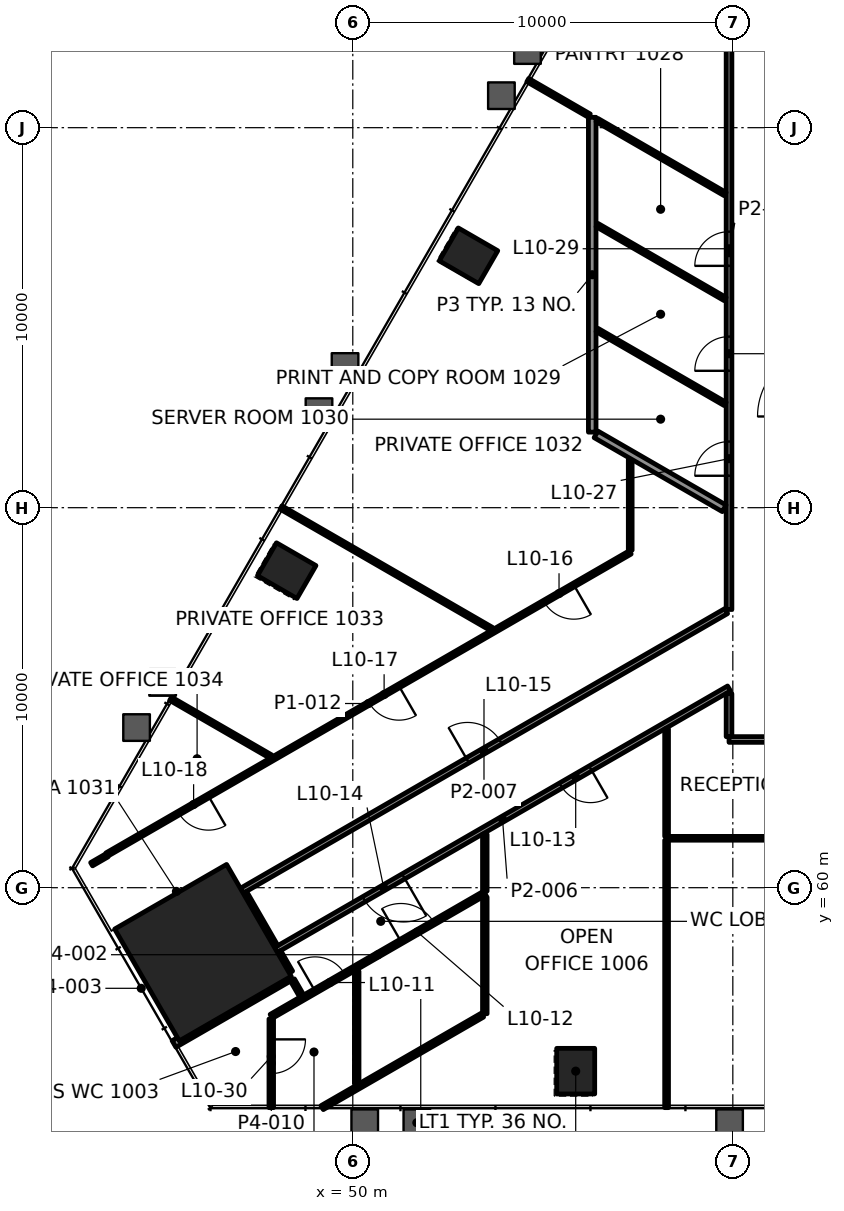
"""IFC4 building model, lengths in metres.
Left out: names, types, materials, properties, quantities, classifications, styles, units other than length and angle.
Written with IfcOpenShell. Run it as: python <this file> out.ifc"""

import sys

from ifc_helpers import new_model, si_unit, direction, frame, frame_2d, origin, origin_2d, place, context, subcontext, project, spatial, rectangle, extrude, element, fill, save


model = new_model("IFC4")
c1 = context("Model", 3, precision=1e-05, world=origin(), true_north=direction((0.0, 1.0)))
c2 = subcontext(c1, "Body", "Model", "MODEL_VIEW")
j1 = project(units=[si_unit("LENGTHUNIT", "METRE"), si_unit("PLANEANGLEUNIT", "RADIAN")], contexts=[c1])
p1 = place(None, origin())
s1 = spatial("IfcSite", under=j1, at=p1, CompositionType="ELEMENT")
p2 = place(p1, origin())
s2 = spatial("IfcBuilding", under=s1, at=p2, CompositionType="ELEMENT")
p3 = place(p2, frame((0.0, 0.0, 48.4)))
s3 = spatial("IfcBuildingStorey", under=s2, at=p3, CompositionType="ELEMENT", Elevation=48.4)
p4 = place(p3, frame((46.057, 58.29, 0.0), z_axis=(0.0, 0.0, 1.0), x_axis=(0.5, -0.866025403784, 0.0)))
e1 = element("IfcColumn", 1, at=p4, inside=s3, PredefinedType="COLUMN", context=c2, shape_type="SweptSolid", body=[
    extrude(rectangle(XDim=3.4, YDim=3.4, at=origin_2d()), origin(), (0.0, 0.0, 1.0), 4.2),
])
for number, where, z_axis, x_axis in (
    (2, (55.865, 55.172, -0.0), (0.0, 0.0, 1.0), (1.0, 0.0, 0.0)),
    (3, (53.045, 76.628, -0.0), (0.0, 0.0, 1.0), (-0.5, -0.866, 0.0)),
    (4, (48.261, 68.343, -0.0), (0.0, 0.0, 1.0), (-0.5, -0.866, 0.0)),
):
    element("IfcColumn", number, at=place(p3, frame(where, z_axis=z_axis, x_axis=x_axis)), inside=s3, PredefinedType="COLUMN", context=c2, shape_type="SweptSolid", body=[
        extrude(rectangle(XDim=1.0, YDim=1.2, at=origin_2d()), origin(), (0.0, 0.0, 1.0), 4.2),
    ])
p5 = place(p3, frame((58.271, 61.3, 0.0), z_axis=(0.0, 0.0, 1.0), x_axis=(1.0, 0.0, 0.0)))
e5 = element("IfcWall", 5, at=p5, inside=s3, PredefinedType="PARTITIONING", context=c2, shape_type="SweptSolid", body=[
    extrude(rectangle(XDim=16.729, YDim=0.1, at=frame_2d((8.365, 0.0))), origin(), (0.0, 0.0, 1.0), 3.4),
])
p6 = place(p5, frame((7.865, 0.0, 0.0)))
e6 = element("IfcOpeningElement", 6, at=p6, cuts=e5, PredefinedType="OPENING", context=c2, shape_type="SweptSolid", body=[
    extrude(rectangle(XDim=1.0, YDim=2.1, at=frame_2d((0.5, 1.05))), frame((0.0, 0.06, 0.0), z_axis=(0.0, -1.0, 0.0), x_axis=(1.0, 0.0, 0.0)), (0.0, 0.0, 1.0), 0.12),
])
p7 = place(p3, frame((90.1, 63.9, 0.0), z_axis=(0.0, 0.0, 1.0), x_axis=(-1.0, 0.0, 0.0)))
e7 = element("IfcWall", 7, at=p7, inside=s3, PredefinedType="PARTITIONING", context=c2, shape_type="SweptSolid", body=[
    extrude(rectangle(XDim=30.2, YDim=0.15, at=frame_2d((15.1, 0.0))), origin(), (0.0, 0.0, 1.0), 3.4),
])
p8 = place(p7, frame((3.578, 0.0, 0.0)))
e8 = element("IfcOpeningElement", 8, at=p8, cuts=e7, PredefinedType="OPENING", context=c2, shape_type="SweptSolid", body=[
    extrude(rectangle(XDim=1.0, YDim=2.1, at=frame_2d((0.5, 1.05))), frame((0.0, 0.085, 0.0), z_axis=(0.0, -1.0, 0.0), x_axis=(1.0, 0.0, 0.0)), (0.0, 0.0, 1.0), 0.17),
])
p9 = place(p7, frame((10.926, 0.0, 0.0)))
e9 = element("IfcOpeningElement", 9, at=p9, cuts=e7, PredefinedType="OPENING", context=c2, shape_type="SweptSolid", body=[
    extrude(rectangle(XDim=1.0, YDim=2.1, at=frame_2d((0.5, 1.05))), frame((0.0, 0.085, 0.0), z_axis=(0.0, -1.0, 0.0), x_axis=(1.0, 0.0, 0.0)), (0.0, 0.0, 1.0), 0.17),
])
p10 = place(p7, frame((22.048, 0.0, 0.0)))
e10 = element("IfcOpeningElement", 10, at=p10, cuts=e7, PredefinedType="OPENING", context=c2, shape_type="SweptSolid", body=[
    extrude(rectangle(XDim=1.0, YDim=2.1, at=frame_2d((0.5, 1.05))), frame((0.0, 0.085, 0.0), z_axis=(0.0, -1.0, 0.0), x_axis=(1.0, 0.0, 0.0)), (0.0, 0.0, 1.0), 0.17),
])
p11 = place(p3, frame((49.194, 54.212, 0.0), z_axis=(0.0, 0.0, 1.0), x_axis=(0.866016997745, 0.500014559404, 0.0)))
e11 = element("IfcWall", 11, at=p11, inside=s3, PredefinedType="PARTITIONING", context=c2, shape_type="SweptSolid", body=[
    extrude(rectangle(XDim=4.871, YDim=0.12, at=frame_2d((2.436, 0.0))), origin(), (0.0, 0.0, 1.0), 3.4),
])
p12 = place(p3, frame((47.855, 56.615, 0.0), z_axis=(0.0, 0.0, 1.0), x_axis=(0.866008853477, 0.500028664877, 0.0)))
e12 = element("IfcWall", 12, at=p12, inside=s3, PredefinedType="PARTITIONING", context=c2, shape_type="SweptSolid", body=[
    extrude(rectangle(XDim=6.487, YDim=0.12, at=frame_2d((3.244, 0.0))), origin(), (0.0, 0.0, 1.0), 3.4),
])
p13 = place(p12, frame((1.329, 0.0, 0.0)))
e13 = element("IfcOpeningElement", 13, at=p13, cuts=e12, PredefinedType="OPENING", context=c2, shape_type="SweptSolid", body=[
    extrude(rectangle(XDim=0.9, YDim=2.1, at=frame_2d((0.45, 1.05))), frame((0.0, 0.07, 0.0), z_axis=(0.0, -1.0, 0.0), x_axis=(1.0, 0.0, 0.0)), (0.0, 0.0, 1.0), 0.14),
])
p14 = place(p12, frame((3.939, 0.0, 0.0)))
e14 = element("IfcOpeningElement", 14, at=p14, cuts=e12, PredefinedType="OPENING", context=c2, shape_type="SweptSolid", body=[
    extrude(rectangle(XDim=1.0, YDim=2.1, at=frame_2d((0.5, 1.05))), frame((0.0, 0.07, 0.0), z_axis=(0.0, -1.0, 0.0), x_axis=(1.0, 0.0, 0.0)), (0.0, 0.0, 1.0), 0.14),
])
p15 = place(p3, frame((45.296, 55.888, 0.0), z_axis=(0.0, 0.0, 1.0), x_axis=(0.866016916595, 0.500014699955, 0.0)))
e15 = element("IfcWall", 15, at=p15, inside=s3, PredefinedType="PARTITIONING", context=c2, shape_type="SweptSolid", body=[
    extrude(rectangle(XDim=3.543, YDim=0.2, at=frame_2d((1.772, 0.0))), origin(), (0.0, 0.0, 1.0), 3.4),
])
p16 = place(p3, frame((59.9, 65.243, 0.0), z_axis=(0.0, 0.0, 1.0), x_axis=(-0.866026378386, -0.499998311937, 0.0)))
e16 = element("IfcWall", 16, at=p16, inside=s3, PredefinedType="PARTITIONING", context=c2, shape_type="SweptSolid", body=[
    extrude(rectangle(XDim=13.764, YDim=0.15, at=frame_2d((6.882, 0.0))), origin(), (0.0, 0.0, 1.0), 3.247),
])
p17 = place(p16, frame((4.209, 0.0, 0.0)))
e17 = element("IfcOpeningElement", 17, at=p17, cuts=e16, PredefinedType="OPENING", context=c2, shape_type="SweptSolid", body=[
    extrude(rectangle(XDim=0.9, YDim=2.1, at=frame_2d((0.45, 1.05))), frame((0.0, 0.085, 0.0), z_axis=(0.0, -1.0, 0.0), x_axis=(1.0, 0.0, 0.0)), (0.0, 0.0, 1.0), 0.17),
])
p18 = place(p16, frame((9.891, 0.0, 0.0)))
e18 = element("IfcOpeningElement", 18, at=p18, cuts=e16, PredefinedType="OPENING", context=c2, shape_type="SweptSolid", body=[
    extrude(rectangle(XDim=1.2, YDim=2.1, at=frame_2d((0.6, 1.05))), frame((0.0, 0.085, 0.0), z_axis=(0.0, -1.0, 0.0), x_axis=(1.0, 0.0, 0.0)), (0.0, 0.0, 1.0), 0.17),
])
p19 = place(p3, frame((47.08, 59.92, 0.0), z_axis=(0.0, 0.0, 1.0), x_axis=(0.866025356753, 0.50000008146, 0.0)))
e19 = element("IfcWall", 19, at=p19, inside=s3, PredefinedType="PARTITIONING", context=c2, shape_type="SweptSolid", body=[
    extrude(rectangle(XDim=14.717, YDim=0.15, at=frame_2d((7.358, 0.0))), origin(), (0.0, 0.0, 1.0), 3.4),
])
p20 = place(p19, frame((6.858, 0.0, 0.0)))
e20 = element("IfcOpeningElement", 20, at=p20, cuts=e19, PredefinedType="OPENING", context=c2, shape_type="SweptSolid", body=[
    extrude(rectangle(XDim=1.0, YDim=2.1, at=frame_2d((0.5, 1.05))), frame((0.0, 0.085, 0.0), z_axis=(0.0, -1.0, 0.0), x_axis=(1.0, 0.0, 0.0)), (0.0, 0.0, 1.0), 0.17),
])
p21 = place(p3, frame((43.127, 60.618, 0.0), z_axis=(0.0, 0.0, 1.0), x_axis=(0.865979310119, 0.500079828073, 0.0)))
e21 = element("IfcWall", 21, at=p21, inside=s3, PredefinedType="PARTITIONING", context=c2, shape_type="SweptSolid", body=[
    extrude(rectangle(XDim=0.473, YDim=0.1, at=frame_2d((0.237, 0.0))), origin(), (0.0, 0.0, 1.0), 3.4),
])
p22 = place(p3, frame((57.3, 68.823, 0.0), z_axis=(0.0, 0.0, 1.0), x_axis=(-0.8660275888, -0.499996215423, 0.0)))
e22 = element("IfcWall", 22, at=p22, inside=s3, PredefinedType="PARTITIONING", context=c2, shape_type="SweptSolid", body=[
    extrude(rectangle(XDim=15.902, YDim=0.1, at=frame_2d((7.951, 0.0))), origin(), (0.0, 0.0, 1.0), 3.4),
])
p23 = place(p22, frame((1.713, 0.0, 0.0)))
e23 = element("IfcOpeningElement", 23, at=p23, cuts=e22, PredefinedType="OPENING", context=c2, shape_type="SweptSolid", body=[
    extrude(rectangle(XDim=0.9, YDim=2.1, at=frame_2d((0.45, 1.05))), frame((0.0, 0.06, 0.0), z_axis=(0.0, -1.0, 0.0), x_axis=(1.0, 0.0, 0.0)), (0.0, 0.0, 1.0), 0.12),
])
p24 = place(p22, frame((7.027, 0.0, 0.0)))
e24 = element("IfcOpeningElement", 24, at=p24, cuts=e22, PredefinedType="OPENING", context=c2, shape_type="SweptSolid", body=[
    extrude(rectangle(XDim=0.9, YDim=2.1, at=frame_2d((0.45, 1.05))), frame((0.0, 0.06, 0.0), z_axis=(0.0, -1.0, 0.0), x_axis=(1.0, 0.0, 0.0)), (0.0, 0.0, 1.0), 0.12),
])
p25 = place(p22, frame((12.816, 0.0, 0.0)))
e25 = element("IfcOpeningElement", 25, at=p25, cuts=e22, PredefinedType="OPENING", context=c2, shape_type="SweptSolid", body=[
    extrude(rectangle(XDim=0.9, YDim=2.1, at=frame_2d((0.45, 1.05))), frame((0.0, 0.06, 0.0), z_axis=(0.0, -1.0, 0.0), x_axis=(1.0, 0.0, 0.0)), (0.0, 0.0, 1.0), 0.12),
])
p26 = place(p3, frame((59.9, 63.975, 0.0), z_axis=(0.0, 0.0, 1.0), x_axis=(0.0, 1.0, 0.0)))
e26 = element("IfcWall", 26, at=p26, inside=s3, PredefinedType="PARTITIONING", context=c2, shape_type="SweptSolid", body=[
    extrude(rectangle(XDim=1.131, YDim=0.15, at=frame_2d((0.565, 0.0))), origin(), (0.0, 0.0, 1.0), 3.247),
])
p27 = place(p3, frame((59.9, 67.321, 0.0), z_axis=(0.0, 0.0, 1.0), x_axis=(0.0, 1.0, 0.0)))
e27 = element("IfcWall", 27, at=p27, inside=s3, PredefinedType="PARTITIONING", context=c2, shape_type="SweptSolid", body=[
    extrude(rectangle(XDim=18.778, YDim=0.15, at=frame_2d((9.389, 0.0))), origin(), (0.0, 0.0, 1.0), 3.4),
])
p28 = place(p27, frame((3.519, 0.0, 0.0)))
e28 = element("IfcOpeningElement", 28, at=p28, cuts=e27, PredefinedType="OPENING", context=c2, shape_type="SweptSolid", body=[
    extrude(rectangle(XDim=0.9, YDim=2.1, at=frame_2d((0.45, 1.05))), frame((0.0, 0.085, 0.0), z_axis=(0.0, -1.0, 0.0), x_axis=(1.0, 0.0, 0.0)), (0.0, 0.0, 1.0), 0.17),
])
p29 = place(p27, frame((6.281, 0.0, 0.0)))
e29 = element("IfcOpeningElement", 29, at=p29, cuts=e27, PredefinedType="OPENING", context=c2, shape_type="SweptSolid", body=[
    extrude(rectangle(XDim=0.9, YDim=2.1, at=frame_2d((0.45, 1.05))), frame((0.0, 0.085, 0.0), z_axis=(0.0, -1.0, 0.0), x_axis=(1.0, 0.0, 0.0)), (0.0, 0.0, 1.0), 0.17),
])
p30 = place(p27, frame((9.042, 0.0, 0.0)))
e30 = element("IfcOpeningElement", 30, at=p30, cuts=e27, PredefinedType="OPENING", context=c2, shape_type="SweptSolid", body=[
    extrude(rectangle(XDim=0.9, YDim=2.1, at=frame_2d((0.45, 1.05))), frame((0.0, 0.085, 0.0), z_axis=(0.0, -1.0, 0.0), x_axis=(1.0, 0.0, 0.0)), (0.0, 0.0, 1.0), 0.17),
])
p31 = place(p3, frame((58.257, 54.212, 0.0), z_axis=(0.0, 0.0, 1.0), x_axis=(0.0, 1.0, 0.0)))
e31 = element("IfcWall", 31, at=p31, inside=s3, PredefinedType="PARTITIONING", context=c2, shape_type="SweptSolid", body=[
    extrude(rectangle(XDim=7.038, YDim=0.1, at=frame_2d((3.519, 0.0))), origin(), (0.0, 0.0, 1.0), 3.165),
])
p32 = place(p3, frame((57.3, 68.88, 0.0), z_axis=(0.0, 0.0, 1.0), x_axis=(0.0, 1.0, 0.0)))
e32 = element("IfcWall", 32, at=p32, inside=s3, PredefinedType="PARTITIONING", context=c2, shape_type="SweptSolid", body=[
    extrude(rectangle(XDim=2.384, YDim=0.1, at=frame_2d((1.192, 0.0))), origin(), (0.0, 0.0, 1.0), 3.4),
])
p33 = place(p3, frame((56.3, 71.988, 0.0), z_axis=(0.0, 0.0, 1.0), x_axis=(0.0, 1.0, 0.0)))
e33 = element("IfcWall", 33, at=p33, inside=s3, PredefinedType="PARTITIONING", context=c2, shape_type="SweptSolid", body=[
    extrude(rectangle(XDim=8.284, YDim=0.2, at=frame_2d((4.142, 0.0))), origin(), (0.0, 0.0, 1.0), 3.4),
])
p34 = place(p3, frame((53.474, 56.683, 0.0), z_axis=(0.0, 0.0, 1.0), x_axis=(0.0, 1.0, 0.0)))
e34 = element("IfcWall", 34, at=p34, inside=s3, PredefinedType="PARTITIONING", context=c2, shape_type="SweptSolid", body=[
    extrude(rectangle(XDim=3.072, YDim=0.12, at=frame_2d((1.536, 0.0))), origin(), (0.0, 0.0, 1.0), 3.4),
])
p35 = place(p3, frame((50.103, 54.846, 0.0), z_axis=(0.0, 0.0, 1.0), x_axis=(0.0, 1.0, 0.0)))
e35 = element("IfcWall", 35, at=p35, inside=s3, PredefinedType="PARTITIONING", context=c2, shape_type="SweptSolid", body=[
    extrude(rectangle(XDim=2.957, YDim=0.12, at=frame_2d((1.479, 0.0))), origin(), (0.0, 0.0, 1.0), 3.4),
])
p36 = place(p3, frame((47.855, 56.545, 0.0), z_axis=(0.0, 0.0, 1.0), x_axis=(0.0, -1.0, 0.0)))
e36 = element("IfcWall", 36, at=p36, inside=s3, PredefinedType="PARTITIONING", context=c2, shape_type="SweptSolid", body=[
    extrude(rectangle(XDim=2.333, YDim=0.12, at=frame_2d((1.167, 0.0))), origin(), (0.0, 0.0, 1.0), 3.4),
])
p37 = place(p36, frame((0.537, 0.0, 0.0)))
e37 = element("IfcOpeningElement", 37, at=p37, cuts=e36, PredefinedType="OPENING", context=c2, shape_type="SweptSolid", body=[
    extrude(rectangle(XDim=0.9, YDim=2.1, at=frame_2d((0.45, 1.05))), frame((0.0, 0.07, 0.0), z_axis=(0.0, -1.0, 0.0), x_axis=(1.0, 0.0, 0.0)), (0.0, 0.0, 1.0), 0.14),
])
p38 = place(p3, frame((48.33, 57.755, 0.0), z_axis=(0.0, 0.0, 1.0), x_axis=(-0.500342721131, 0.865827443207, 0.0)))
e38 = element("IfcWall", 38, at=p38, inside=s3, PredefinedType="PARTITIONING", context=c2, shape_type="SweptSolid", body=[
    extrude(rectangle(XDim=0.625, YDim=0.2, at=frame_2d((0.312, 0.0))), origin(), (0.0, 0.0, 1.0), 3.4),
])
p39 = place(p3, frame((48.652, 57.156, 0.0), z_axis=(0.0, 0.0, 1.0), x_axis=(-0.499913221443, 0.866075499611, 0.0)))
e39 = element("IfcWall", 39, at=p39, inside=s3, PredefinedType="PARTITIONING", context=c2, shape_type="SweptSolid", body=[
    extrude(rectangle(XDim=0.48, YDim=0.12, at=frame_2d((0.24, 0.0))), origin(), (0.0, 0.0, 1.0), 3.4),
])
p40 = place(p3, frame((59.799, 78.252, 0.0), z_axis=(0.0, 0.0, 1.0), x_axis=(-0.866036349784, 0.499981040493, 0.0)))
e40 = element("IfcWall", 40, at=p40, inside=s3, PredefinedType="PARTITIONING", context=c2, shape_type="SweptSolid", body=[
    extrude(rectangle(XDim=3.896, YDim=0.1, at=frame_2d((1.948, 0.0))), origin(), (0.0, 0.0, 1.0), 3.4),
])
p41 = place(p3, frame((59.799, 75.49, 0.0), z_axis=(0.0, 0.0, 1.0), x_axis=(-0.866043624834, 0.499968438888, 0.0)))
e41 = element("IfcWall", 41, at=p41, inside=s3, PredefinedType="PARTITIONING", context=c2, shape_type="SweptSolid", body=[
    extrude(rectangle(XDim=3.895, YDim=0.1, at=frame_2d((1.947, 0.0))), origin(), (0.0, 0.0, 1.0), 3.4),
])
p42 = place(p3, frame((59.799, 72.729, 0.0), z_axis=(0.0, 0.0, 1.0), x_axis=(-0.866016482536, 0.500015451737, 0.0)))
e42 = element("IfcWall", 42, at=p42, inside=s3, PredefinedType="PARTITIONING", context=c2, shape_type="SweptSolid", body=[
    extrude(rectangle(XDim=3.895, YDim=0.1, at=frame_2d((1.948, 0.0))), origin(), (0.0, 0.0, 1.0), 3.4),
])
p43 = place(p3, frame((59.773, 69.982, 0.0), z_axis=(0.0, 0.0, 1.0), x_axis=(-0.866043624834, 0.499968438888, 0.0)))
e43 = element("IfcWall", 43, at=p43, inside=s3, PredefinedType="PARTITIONING", context=c2, shape_type="SweptSolid", body=[
    extrude(rectangle(XDim=3.895, YDim=0.2, at=frame_2d((1.947, 0.0))), origin(), (0.0, 0.0, 1.0), 3.4),
])
p44 = place(p3, frame((53.654, 66.805, 0.0), z_axis=(0.0, 0.0, 1.0), x_axis=(-0.866029926444, 0.499992166441, 0.0)))
e44 = element("IfcWall", 44, at=p44, inside=s3, PredefinedType="PARTITIONING", context=c2, shape_type="SweptSolid", body=[
    extrude(rectangle(XDim=6.399, YDim=0.1, at=frame_2d((3.199, 0.0))), origin(), (0.0, 0.0, 1.0), 3.165),
])
p45 = place(p3, frame((47.843, 63.45, 0.0), z_axis=(0.0, 0.0, 1.0), x_axis=(-0.86603332906, 0.499986272769, 0.0)))
e45 = element("IfcWall", 45, at=p45, inside=s3, PredefinedType="PARTITIONING", context=c2, shape_type="SweptSolid", body=[
    extrude(rectangle(XDim=3.044, YDim=0.1, at=frame_2d((1.522, 0.0))), origin(), (0.0, 0.0, 1.0), 3.4),
])
p46 = place(p3, frame((53.474, 59.91, 0.0), z_axis=(0.0, 0.0, 1.0), x_axis=(0.0, 1.0, 0.0)))
e46 = element("IfcWall", 46, at=p46, inside=s3, PredefinedType="PARTITIONING", context=c2, shape_type="SweptSolid", body=[
    extrude(rectangle(XDim=1.496, YDim=0.12, at=frame_2d((0.748, 0.0))), origin(), (0.0, 0.0, 1.0), 3.4),
])
p47 = place(p3, frame((47.942, 58.426, 0.0), z_axis=(0.0, 0.0, 1.0), x_axis=(-0.499991515992, 0.866030301974, 0.0)))
e47 = element("IfcWall", 47, at=p47, inside=s3, PredefinedType="PARTITIONING", context=c2, shape_type="SweptSolid", body=[
    extrude(rectangle(XDim=1.649, YDim=0.2, at=frame_2d((0.825, 0.0))), origin(), (0.0, 0.0, 1.0), 3.247),
])
p48 = place(p3, frame((56.225, 80.316, 0.0), z_axis=(0.0, 0.0, 1.0), x_axis=(-0.86600952399, 0.500027503603, 0.0)))
e48 = element("IfcWall", 48, at=p48, inside=s3, PredefinedType="PARTITIONING", context=c2, shape_type="SweptSolid", body=[
    extrude(rectangle(XDim=1.871, YDim=0.1, at=frame_2d((0.935, 0.0))), origin(), (0.0, 0.0, 1.0), 3.165),
])
p49 = place(p3, frame((58.257, 61.35, 0.0), z_axis=(0.0, 0.0, 1.0), x_axis=(0.0, 1.0, 0.0)))
e49 = element("IfcWall", 49, at=p49, inside=s3, PredefinedType="PARTITIONING", context=c2, shape_type="SweptSolid", body=[
    extrude(rectangle(XDim=2.828, YDim=0.1, at=frame_2d((1.414, 0.0))), origin(), (0.0, 0.0, 1.0), 3.247),
])
p50 = place(p13, origin())
e50 = element("IfcDoor", 50, at=p50, inside=s3, OperationType="SINGLE_SWING_LEFT", PredefinedType="DOOR", context=c2, shape_type="SweptSolid", body=[
    extrude(rectangle(XDim=0.9, YDim=2.1, at=frame_2d((0.45, 1.05))), frame((0.0, 0.025, 0.0), z_axis=(0.0, -1.0, 0.0), x_axis=(1.0, 0.0, 0.0)), (0.0, 0.0, 1.0), 0.05),
])
fill(e13, e50)
p51 = place(p14, origin())
e51 = element("IfcDoor", 51, at=p51, inside=s3, OperationType="SINGLE_SWING_RIGHT", PredefinedType="DOOR", context=c2, shape_type="SweptSolid", body=[
    extrude(rectangle(XDim=1.0, YDim=2.1, at=frame_2d((0.5, 1.05))), frame((0.0, 0.025, 0.0), z_axis=(0.0, -1.0, 0.0), x_axis=(1.0, 0.0, 0.0)), (0.0, 0.0, 1.0), 0.05),
])
fill(e14, e51)
p52 = place(p17, origin())
e52 = element("IfcDoor", 52, at=p52, inside=s3, OperationType="SINGLE_SWING_RIGHT", PredefinedType="DOOR", context=c2, shape_type="SweptSolid", body=[
    extrude(rectangle(XDim=0.9, YDim=2.1, at=frame_2d((0.45, 1.05))), frame((0.0, 0.025, 0.0), z_axis=(0.0, -1.0, 0.0), x_axis=(1.0, 0.0, 0.0)), (0.0, 0.0, 1.0), 0.05),
])
fill(e17, e52)
p53 = place(p18, origin())
e53 = element("IfcDoor", 53, at=p53, inside=s3, OperationType="DOUBLE_DOOR_SINGLE_SWING", PredefinedType="DOOR", context=c2, shape_type="SweptSolid", body=[
    extrude(rectangle(XDim=1.2, YDim=2.1, at=frame_2d((0.6, 1.05))), frame((0.0, 0.025, 0.0), z_axis=(0.0, -1.0, 0.0), x_axis=(1.0, 0.0, 0.0)), (0.0, 0.0, 1.0), 0.05),
])
fill(e18, e53)
p54 = place(p20, origin())
e54 = element("IfcDoor", 54, at=p54, inside=s3, OperationType="SINGLE_SWING_RIGHT", PredefinedType="DOOR", context=c2, shape_type="SweptSolid", body=[
    extrude(rectangle(XDim=1.0, YDim=2.1, at=frame_2d((0.5, 1.05))), frame((0.0, 0.025, 0.0), z_axis=(0.0, -1.0, 0.0), x_axis=(1.0, 0.0, 0.0)), (0.0, 0.0, 1.0), 0.05),
])
fill(e20, e54)
p55 = place(p23, origin())
e55 = element("IfcDoor", 55, at=p55, inside=s3, OperationType="SINGLE_SWING_RIGHT", PredefinedType="DOOR", context=c2, shape_type="SweptSolid", body=[
    extrude(rectangle(XDim=0.9, YDim=2.1, at=frame_2d((0.45, 1.05))), frame((0.0, 0.025, 0.0), z_axis=(0.0, -1.0, 0.0), x_axis=(1.0, 0.0, 0.0)), (0.0, 0.0, 1.0), 0.05),
])
fill(e23, e55)
p56 = place(p24, origin())
e56 = element("IfcDoor", 56, at=p56, inside=s3, OperationType="SINGLE_SWING_LEFT", PredefinedType="DOOR", context=c2, shape_type="SweptSolid", body=[
    extrude(rectangle(XDim=0.9, YDim=2.1, at=frame_2d((0.45, 1.05))), frame((0.0, 0.025, 0.0), z_axis=(0.0, -1.0, 0.0), x_axis=(1.0, 0.0, 0.0)), (0.0, 0.0, 1.0), 0.05),
])
fill(e24, e56)
p57 = place(p25, origin())
e57 = element("IfcDoor", 57, at=p57, inside=s3, OperationType="SINGLE_SWING_RIGHT", PredefinedType="DOOR", context=c2, shape_type="SweptSolid", body=[
    extrude(rectangle(XDim=0.9, YDim=2.1, at=frame_2d((0.45, 1.05))), frame((0.0, 0.025, 0.0), z_axis=(0.0, -1.0, 0.0), x_axis=(1.0, 0.0, 0.0)), (0.0, 0.0, 1.0), 0.05),
])
fill(e25, e57)
p58 = place(p28, origin())
e58 = element("IfcDoor", 58, at=p58, inside=s3, OperationType="SINGLE_SWING_LEFT", PredefinedType="DOOR", context=c2, shape_type="SweptSolid", body=[
    extrude(rectangle(XDim=0.9, YDim=2.1, at=frame_2d((0.45, 1.05))), frame((0.0, 0.025, 0.0), z_axis=(0.0, -1.0, 0.0), x_axis=(1.0, 0.0, 0.0)), (0.0, 0.0, 1.0), 0.05),
])
fill(e28, e58)
p59 = place(p29, origin())
e59 = element("IfcDoor", 59, at=p59, inside=s3, OperationType="SINGLE_SWING_RIGHT", PredefinedType="DOOR", context=c2, shape_type="SweptSolid", body=[
    extrude(rectangle(XDim=0.9, YDim=2.1, at=frame_2d((0.45, 1.05))), frame((0.0, 0.025, 0.0), z_axis=(0.0, -1.0, 0.0), x_axis=(1.0, 0.0, 0.0)), (0.0, 0.0, 1.0), 0.05),
])
fill(e29, e59)
p60 = place(p30, origin())
e60 = element("IfcDoor", 60, at=p60, inside=s3, OperationType="SINGLE_SWING_LEFT", PredefinedType="DOOR", context=c2, shape_type="SweptSolid", body=[
    extrude(rectangle(XDim=0.9, YDim=2.1, at=frame_2d((0.45, 1.05))), frame((0.0, 0.025, 0.0), z_axis=(0.0, -1.0, 0.0), x_axis=(1.0, 0.0, 0.0)), (0.0, 0.0, 1.0), 0.05),
])
fill(e30, e60)
p61 = place(p37, origin())
e61 = element("IfcDoor", 61, at=p61, inside=s3, OperationType="SINGLE_SWING_LEFT", PredefinedType="DOOR", context=c2, shape_type="SweptSolid", body=[
    extrude(rectangle(XDim=0.9, YDim=2.1, at=frame_2d((0.45, 1.05))), frame((0.0, 0.025, 0.0), z_axis=(0.0, -1.0, 0.0), x_axis=(1.0, 0.0, 0.0)), (0.0, 0.0, 1.0), 0.05),
])
fill(e37, e61)
save(model, sys.argv[1])
